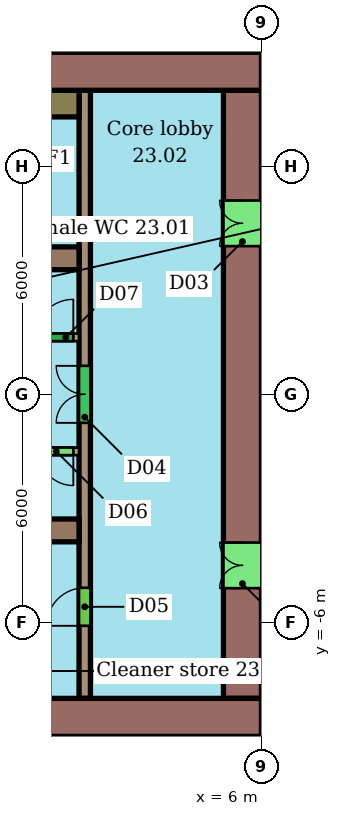
"""IFC4 building model, lengths in metres.
Left out: names, types, materials, properties, quantities, classifications, styles, units other than length and angle.
Written with IfcOpenShell. Run it as: python <this file> out.ifc"""

import sys

from ifc_helpers import new_model, si_unit, direction, frame, frame_2d, origin, place, context, subcontext, project, spatial, rectangle, extrude, element, fill, save


model = new_model("IFC4")
c1 = context("Model", 3, precision=1e-05, world=origin(), true_north=direction((0.0, 1.0)))
c2 = subcontext(c1, "Body", "Model", "MODEL_VIEW")
j1 = project(units=[si_unit("LENGTHUNIT", "METRE"), si_unit("PLANEANGLEUNIT", "RADIAN")], contexts=[c1])
p1 = place(None, origin())
s1 = spatial("IfcSite", under=j1, at=p1, CompositionType="ELEMENT")
p2 = place(p1, origin())
s2 = spatial("IfcBuilding", under=s1, at=p2, CompositionType="ELEMENT")
p3 = place(p2, frame((0.0, 0.0, 103.0)))
s3 = spatial("IfcBuildingStorey", under=s2, at=p3, CompositionType="ELEMENT", Elevation=103.0)
p4 = place(p3, frame((6.0, 8.5, 0.0), z_axis=(0.0, 0.0, 1.0), x_axis=(-1.0, 0.0, 0.0)))
e1 = element("IfcWall", 1, at=p4, inside=s3, PredefinedType="SHEAR", context=c2, shape_type="SweptSolid", body=[
    extrude(rectangle(XDim=12.0, YDim=1.0, at=frame_2d((6.0, 0.0))), origin(), (0.0, 0.0, 1.0), 3.3),
])
p5 = place(p4, frame((5.6, 0.0, 0.0)))
e2 = element("IfcOpeningElement", 2, at=p5, cuts=e1, PredefinedType="OPENING", context=c2, shape_type="SweptSolid", body=[
    extrude(rectangle(XDim=1.2, YDim=2.1, at=frame_2d((0.6, 1.05))), frame((0.0, 0.51, 0.0), z_axis=(0.0, -1.0, 0.0), x_axis=(1.0, 0.0, 0.0)), (0.0, 0.0, 1.0), 1.02),
])
p6 = place(p3, frame((-18.0, -8.5, 0.0), z_axis=(0.0, 0.0, 1.0), x_axis=(1.0, 0.0, 0.0)))
e3 = element("IfcWall", 3, at=p6, inside=s3, PredefinedType="SHEAR", context=c2, shape_type="SweptSolid", body=[
    extrude(rectangle(XDim=24.0, YDim=1.0, at=frame_2d((12.0, 0.0))), origin(), (0.0, 0.0, 1.0), 3.3),
])
p7 = place(p6, frame((6.0, 0.0, 0.0)))
e4 = element("IfcOpeningElement", 4, at=p7, cuts=e3, PredefinedType="OPENING", context=c2, shape_type="SweptSolid", body=[
    extrude(rectangle(XDim=1.2, YDim=2.1, at=frame_2d((0.6, 1.05))), frame((0.0, 0.51, 0.0), z_axis=(0.0, -1.0, 0.0), x_axis=(1.0, 0.0, 0.0)), (0.0, 0.0, 1.0), 1.02),
])
p8 = place(p3, frame((5.5, -8.0, 0.0), z_axis=(0.0, 0.0, 1.0), x_axis=(0.0, 1.0, 0.0)))
e5 = element("IfcWall", 5, at=p8, inside=s3, PredefinedType="SHEAR", context=c2, shape_type="SweptSolid", body=[
    extrude(rectangle(XDim=16.0, YDim=1.0, at=frame_2d((8.0, 0.0))), origin(), (0.0, 0.0, 1.0), 3.3),
])
p9 = place(p8, frame((2.9, 0.0, 0.0)))
e6 = element("IfcOpeningElement", 6, at=p9, cuts=e5, PredefinedType="OPENING", context=c2, shape_type="SweptSolid", body=[
    extrude(rectangle(XDim=1.2, YDim=2.1, at=frame_2d((0.6, 1.05))), frame((0.0, 0.51, 0.0), z_axis=(0.0, -1.0, 0.0), x_axis=(1.0, 0.0, 0.0)), (0.0, 0.0, 1.0), 1.02),
])
p10 = place(p8, frame((11.9, 0.0, 0.0)))
e7 = element("IfcOpeningElement", 7, at=p10, cuts=e5, PredefinedType="OPENING", context=c2, shape_type="SweptSolid", body=[
    extrude(rectangle(XDim=1.2, YDim=2.1, at=frame_2d((0.6, 1.05))), frame((0.0, 0.51, 0.0), z_axis=(0.0, -1.0, 0.0), x_axis=(1.0, 0.0, 0.0)), (0.0, 0.0, 1.0), 1.02),
])
for number, where, z_axis, x_axis in (
    (8, (-6.0, 3.58, 0.0), (0.0, 0.0, 1.0), (1.0, 0.0, 0.0)),
    (9, (-6.0, -3.58, 0.0), (0.0, 0.0, 1.0), (1.0, 0.0, 0.0)),
):
    element("IfcWall", number, at=place(p3, frame(where, z_axis=z_axis, x_axis=x_axis)), inside=s3, PredefinedType="SHEAR", context=c2, shape_type="SweptSolid", body=[
        extrude(rectangle(XDim=7.2, YDim=0.6, at=frame_2d((3.6, 0.0))), origin(), (0.0, 0.0, 1.0), 3.3),
    ])
p11 = place(p3, frame((1.35, -8.0, 0.0), z_axis=(0.0, 0.0, 1.0), x_axis=(0.0, 1.0, 0.0)))
e10 = element("IfcWall", 10, at=p11, inside=s3, PredefinedType="SHEAR", context=c2, shape_type="SweptSolid", body=[
    extrude(rectangle(XDim=16.0, YDim=0.3, at=frame_2d((8.0, 0.0))), origin(), (0.0, 0.0, 1.0), 3.3),
])
p12 = place(p11, frame((1.91, 0.0, 0.0)))
e11 = element("IfcOpeningElement", 11, at=p12, cuts=e10, PredefinedType="OPENING", context=c2, shape_type="SweptSolid", body=[
    extrude(rectangle(XDim=1.0, YDim=2.1, at=frame_2d((0.5, 1.05))), frame((0.0, 0.16, 0.0), z_axis=(0.0, -1.0, 0.0), x_axis=(1.0, 0.0, 0.0)), (0.0, 0.0, 1.0), 0.32),
])
p13 = place(p11, frame((7.25, 0.0, 0.0)))
e12 = element("IfcOpeningElement", 12, at=p13, cuts=e10, PredefinedType="OPENING", context=c2, shape_type="SweptSolid", body=[
    extrude(rectangle(XDim=1.5, YDim=2.1, at=frame_2d((0.75, 1.05))), frame((0.0, 0.16, 0.0), z_axis=(0.0, -1.0, 0.0), x_axis=(1.0, 0.0, 0.0)), (0.0, 0.0, 1.0), 0.32),
])
p14 = place(p3, frame((-13.2, 1.5, 0.0), z_axis=(0.0, 0.0, 1.0), x_axis=(1.0, 0.0, 0.0)))
e13 = element("IfcWall", 13, at=p14, inside=s3, PredefinedType="SHEAR", context=c2, shape_type="SweptSolid", body=[
    extrude(rectangle(XDim=14.4, YDim=0.2, at=frame_2d((7.2, 0.0))), origin(), (0.0, 0.0, 1.0), 3.3),
])
p15 = place(p14, frame((0.546, 0.0, 0.0)))
e14 = element("IfcOpeningElement", 14, at=p15, cuts=e13, PredefinedType="OPENING", context=c2, shape_type="SweptSolid", body=[
    extrude(rectangle(XDim=1.1, YDim=2.1, at=frame_2d((0.55, 1.05))), frame((0.0, 0.11, 0.0), z_axis=(0.0, -1.0, 0.0), x_axis=(1.0, 0.0, 0.0)), (0.0, 0.0, 1.0), 0.22),
])
p16 = place(p14, frame((2.988, 0.0, 0.0)))
e15 = element("IfcOpeningElement", 15, at=p16, cuts=e13, PredefinedType="OPENING", context=c2, shape_type="SweptSolid", body=[
    extrude(rectangle(XDim=1.1, YDim=2.1, at=frame_2d((0.55, 1.05))), frame((0.0, 0.11, 0.0), z_axis=(0.0, -1.0, 0.0), x_axis=(1.0, 0.0, 0.0)), (0.0, 0.0, 1.0), 0.22),
])
p17 = place(p14, frame((5.429, 0.0, 0.0)))
e16 = element("IfcOpeningElement", 16, at=p17, cuts=e13, PredefinedType="OPENING", context=c2, shape_type="SweptSolid", body=[
    extrude(rectangle(XDim=1.1, YDim=2.1, at=frame_2d((0.55, 1.05))), frame((0.0, 0.11, 0.0), z_axis=(0.0, -1.0, 0.0), x_axis=(1.0, 0.0, 0.0)), (0.0, 0.0, 1.0), 0.22),
])
p18 = place(p14, frame((7.871, 0.0, 0.0)))
e17 = element("IfcOpeningElement", 17, at=p18, cuts=e13, PredefinedType="OPENING", context=c2, shape_type="SweptSolid", body=[
    extrude(rectangle(XDim=1.1, YDim=2.1, at=frame_2d((0.55, 1.05))), frame((0.0, 0.11, 0.0), z_axis=(0.0, -1.0, 0.0), x_axis=(1.0, 0.0, 0.0)), (0.0, 0.0, 1.0), 0.22),
])
p19 = place(p14, frame((11.607, 0.0, 0.0)))
e18 = element("IfcOpeningElement", 18, at=p19, cuts=e13, PredefinedType="OPENING", context=c2, shape_type="SweptSolid", body=[
    extrude(rectangle(XDim=0.9, YDim=2.1, at=frame_2d((0.45, 1.05))), frame((0.0, 0.11, 0.0), z_axis=(0.0, -1.0, 0.0), x_axis=(1.0, 0.0, 0.0)), (0.0, 0.0, 1.0), 0.22),
])
p20 = place(p14, frame((13.25, 0.0, 0.0)))
e19 = element("IfcOpeningElement", 19, at=p20, cuts=e13, PredefinedType="OPENING", context=c2, shape_type="SweptSolid", body=[
    extrude(rectangle(XDim=1.0, YDim=2.1, at=frame_2d((0.5, 1.05))), frame((0.0, 0.11, 0.0), z_axis=(0.0, -1.0, 0.0), x_axis=(1.0, 0.0, 0.0)), (0.0, 0.0, 1.0), 0.22),
])
p21 = place(p3, frame((1.2, -1.5, 0.0), z_axis=(0.0, 0.0, 1.0), x_axis=(-1.0, 0.0, 0.0)))
e20 = element("IfcWall", 20, at=p21, inside=s3, PredefinedType="SHEAR", context=c2, shape_type="SweptSolid", body=[
    extrude(rectangle(XDim=14.4, YDim=0.2, at=frame_2d((7.2, 0.0))), origin(), (0.0, 0.0, 1.0), 3.3),
])
p22 = place(p21, frame((7.821, 0.0, 0.0)))
e21 = element("IfcOpeningElement", 21, at=p22, cuts=e20, PredefinedType="OPENING", context=c2, shape_type="SweptSolid", body=[
    extrude(rectangle(XDim=1.2, YDim=2.1, at=frame_2d((0.6, 1.05))), frame((0.0, 0.11, 0.0), z_axis=(0.0, -1.0, 0.0), x_axis=(1.0, 0.0, 0.0)), (0.0, 0.0, 1.0), 0.22),
])
p23 = place(p21, frame((0.15, 0.0, 0.0)))
e22 = element("IfcOpeningElement", 22, at=p23, cuts=e20, PredefinedType="OPENING", context=c2, shape_type="SweptSolid", body=[
    extrude(rectangle(XDim=0.9, YDim=2.1, at=frame_2d((0.45, 1.05))), frame((0.0, 0.11, 0.0), z_axis=(0.0, -1.0, 0.0), x_axis=(1.0, 0.0, 0.0)), (0.0, 0.0, 1.0), 0.22),
])
p24 = place(p3, frame((0.4, 7.65, 0.0), z_axis=(0.0, 0.0, 1.0), x_axis=(1.0, 0.0, 0.0)))
e23 = element("IfcWall", 23, at=p24, inside=s3, PredefinedType="SHEAR", context=c2, shape_type="SweptSolid", body=[
    extrude(rectangle(XDim=0.8, YDim=0.7, at=frame_2d((0.4, 0.0))), origin(), (0.0, 0.0, 1.0), 3.3),
])
p25 = place(p9, origin())
e24 = element("IfcDoor", 24, at=p25, inside=s3, OperationType="DOUBLE_DOOR_SINGLE_SWING", PredefinedType="NOTDEFINED", context=c2, shape_type="SweptSolid", body=[
    extrude(rectangle(XDim=1.2, YDim=2.1, at=frame_2d((0.6, 1.05))), frame((0.0, 0.025, 0.0), z_axis=(0.0, -1.0, 0.0), x_axis=(1.0, 0.0, 0.0)), (0.0, 0.0, 1.0), 0.05),
])
fill(e6, e24)
p26 = place(p10, origin())
e25 = element("IfcDoor", 25, at=p26, inside=s3, OperationType="DOUBLE_DOOR_SINGLE_SWING", PredefinedType="NOTDEFINED", context=c2, shape_type="SweptSolid", body=[
    extrude(rectangle(XDim=1.2, YDim=2.1, at=frame_2d((0.6, 1.05))), frame((0.0, 0.025, 0.0), z_axis=(0.0, -1.0, 0.0), x_axis=(1.0, 0.0, 0.0)), (0.0, 0.0, 1.0), 0.05),
])
fill(e7, e25)
p27 = place(p12, origin())
e26 = element("IfcDoor", 26, at=p27, inside=s3, OperationType="SINGLE_SWING_LEFT", PredefinedType="NOTDEFINED", context=c2, shape_type="SweptSolid", body=[
    extrude(rectangle(XDim=1.0, YDim=2.1, at=frame_2d((0.5, 1.05))), frame((0.0, 0.025, 0.0), z_axis=(0.0, -1.0, 0.0), x_axis=(1.0, 0.0, 0.0)), (0.0, 0.0, 1.0), 0.05),
])
fill(e11, e26)
p28 = place(p13, origin())
e27 = element("IfcDoor", 27, at=p28, inside=s3, OperationType="DOUBLE_DOOR_SINGLE_SWING", PredefinedType="NOTDEFINED", context=c2, shape_type="SweptSolid", body=[
    extrude(rectangle(XDim=1.5, YDim=2.1, at=frame_2d((0.75, 1.05))), frame((0.0, 0.025, 0.0), z_axis=(0.0, -1.0, 0.0), x_axis=(1.0, 0.0, 0.0)), (0.0, 0.0, 1.0), 0.05),
])
fill(e12, e27)
p29 = place(p20, origin())
e28 = element("IfcDoor", 28, at=p29, inside=s3, OperationType="SINGLE_SWING_RIGHT", PredefinedType="NOTDEFINED", context=c2, shape_type="SweptSolid", body=[
    extrude(rectangle(XDim=1.0, YDim=2.1, at=frame_2d((0.5, 1.05))), frame((0.0, 0.025, 0.0), z_axis=(0.0, -1.0, 0.0), x_axis=(1.0, 0.0, 0.0)), (0.0, 0.0, 1.0), 0.05),
])
fill(e19, e28)
p30 = place(p23, origin())
e29 = element("IfcDoor", 29, at=p30, inside=s3, OperationType="SINGLE_SWING_LEFT", PredefinedType="NOTDEFINED", context=c2, shape_type="SweptSolid", body=[
    extrude(rectangle(XDim=0.9, YDim=2.1, at=frame_2d((0.45, 1.05))), frame((0.0, 0.025, 0.0), z_axis=(0.0, -1.0, 0.0), x_axis=(1.0, 0.0, 0.0)), (0.0, 0.0, 1.0), 0.05),
])
fill(e22, e29)
save(model, sys.argv[1])
